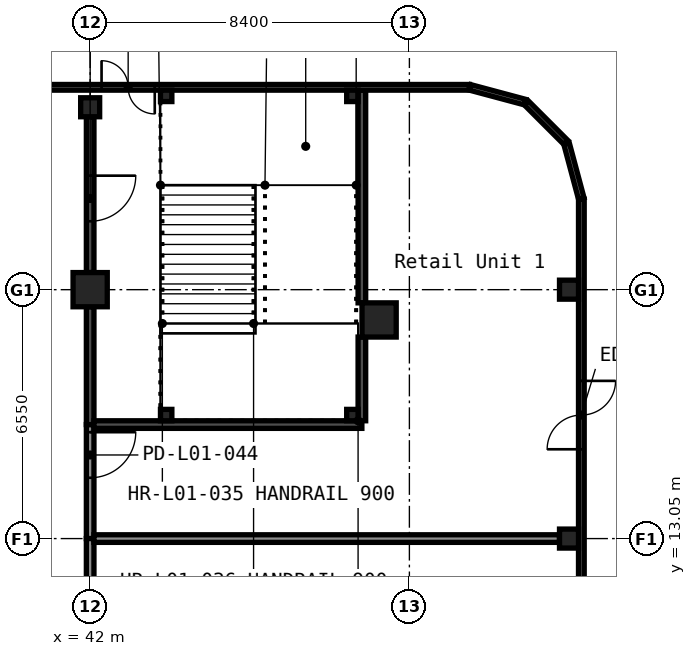
"""IFC4 building model, lengths in metres.
Left out: names, types, materials, properties, quantities, classifications, styles, units other than length and angle.
Written with IfcOpenShell. Run it as: python <this file> out.ifc"""

import sys

from ifc_helpers import new_model, si_unit, direction, frame, frame_2d, origin, origin_2d, place, context, subcontext, project, spatial, rectangle, hollow_rectangle, extrude, element, fill, save


model = new_model("IFC4")
c1 = context("Model", 3, precision=1e-05, world=origin(), true_north=direction((0.0, 1.0)))
c2 = subcontext(c1, "Body", "Model", "MODEL_VIEW")
j1 = project(units=[si_unit("LENGTHUNIT", "METRE"), si_unit("PLANEANGLEUNIT", "RADIAN")], contexts=[c1])
p1 = place(None, origin())
s1 = spatial("IfcSite", under=j1, at=p1, CompositionType="ELEMENT")
p2 = place(p1, origin())
s2 = spatial("IfcBuilding", under=s1, at=p2, CompositionType="ELEMENT")
p3 = place(p2, origin())
s3 = spatial("IfcBuildingStorey", under=s2, at=p3, CompositionType="ELEMENT", Elevation=0.0)
for number, where, z_axis, x_axis in (
    (1, (42.0, 19.6, -0.3), (0.0, 0.0, 1.0), (1.0, 0.0, 0.0)),
    (2, (49.603, 18.803, -0.3), (0.0, 0.0, 1.0), (1.0, 0.0, 0.0)),
):
    element("IfcColumn", number, at=place(p3, frame(where, z_axis=z_axis, x_axis=x_axis)), inside=s3, PredefinedType="COLUMN", context=c2, shape_type="SweptSolid", body=[
        extrude(hollow_rectangle(XDim=0.9, YDim=0.9, WallThickness=0.036, at=origin_2d()), origin(), (0.0, 0.0, 1.0), 8.9),
    ])
for number, where, z_axis, x_axis in (
    (3, (42.0, 24.4, -0.3), (0.0, 0.0, 1.0), (1.0, 0.0, 0.0)),
    (4, (54.6, 13.05, -0.3), (0.0, 0.0, 1.0), (1.0, 0.0, 0.0)),
    (5, (54.6, 19.6, -0.3), (0.0, 0.0, 1.0), (1.0, 0.0, 0.0)),
):
    element("IfcColumn", number, at=place(p3, frame(where, z_axis=z_axis, x_axis=x_axis)), inside=s3, PredefinedType="COLUMN", context=c2, shape_type="SweptSolid", body=[
        extrude(hollow_rectangle(XDim=0.5, YDim=0.5, WallThickness=0.019, InnerFilletRadius=0.029, OuterFilletRadius=0.048, at=origin_2d()), origin(), (0.0, 0.0, 1.0), 8.9),
    ])
p4 = place(p3, frame((42.0, 16.05, 0.0), z_axis=(0.0, 0.0, 1.0), x_axis=(0.0, -1.0, 0.0)))
e6 = element("IfcWall", 6, at=p4, inside=s3, PredefinedType="PARTITIONING", context=c2, shape_type="SweptSolid", body=[
    extrude(rectangle(XDim=3.0, YDim=0.2, at=frame_2d((1.5, 0.0))), origin(), (0.0, 0.0, 1.0), 8.6),
])
p5 = place(p4, frame((0.2, 0.0, 0.0)))
e7 = element("IfcOpeningElement", 7, at=p5, cuts=e6, PredefinedType="OPENING", context=c2, shape_type="SweptSolid", body=[
    extrude(rectangle(XDim=1.2, YDim=2.1, at=frame_2d((0.6, 1.05))), frame((0.0, 0.11, 0.0), z_axis=(0.0, -1.0, 0.0), x_axis=(1.0, 0.0, 0.0)), (0.0, 0.0, 1.0), 0.22),
])
p6 = place(p3, frame((42.0, 13.05, 0.0), z_axis=(0.0, 0.0, 1.0), x_axis=(0.0, -1.0, 0.0)))
e8 = element("IfcWall", 8, at=p6, inside=s3, PredefinedType="PARTITIONING", context=c2, shape_type="SweptSolid", body=[
    extrude(rectangle(XDim=6.05, YDim=0.2, at=frame_2d((3.025, 0.0))), origin(), (0.0, 0.0, 1.0), 8.6),
])
p7 = place(p6, frame((2.675, 0.0, 0.0)))
e9 = element("IfcOpeningElement", 9, at=p7, cuts=e8, PredefinedType="OPENING", context=c2, shape_type="SweptSolid", body=[
    extrude(rectangle(XDim=1.2, YDim=2.1, at=frame_2d((0.6, 1.05))), frame((0.0, 0.11, 0.0), z_axis=(0.0, -1.0, 0.0), x_axis=(1.0, 0.0, 0.0)), (0.0, 0.0, 1.0), 0.22),
])
p8 = place(p3, frame((42.0, 16.05, 0.0), z_axis=(0.0, 0.0, 1.0), x_axis=(0.0, 1.0, 0.0)))
e10 = element("IfcWall", 10, at=p8, inside=s3, PredefinedType="SHEAR", context=c2, shape_type="SweptSolid", body=[
    extrude(rectangle(XDim=3.1, YDim=0.2, at=frame_2d((1.55, 0.0))), origin(), (0.0, 0.0, 1.0), 8.6),
])
p9 = place(p3, frame((42.0, 20.05, 0.0), z_axis=(0.0, 0.0, 1.0), x_axis=(0.0, 1.0, 0.0)))
e11 = element("IfcWall", 11, at=p9, inside=s3, PredefinedType="SHEAR", context=c2, shape_type="SweptSolid", body=[
    extrude(rectangle(XDim=4.1, YDim=0.2, at=frame_2d((2.05, 0.0))), origin(), (0.0, 0.0, 1.0), 8.6),
])
p10 = place(p9, frame((1.35, 0.0, 0.0)))
e12 = element("IfcOpeningElement", 12, at=p10, cuts=e11, PredefinedType="OPENING", context=c2, shape_type="SweptSolid", body=[
    extrude(rectangle(XDim=1.2, YDim=2.1, at=frame_2d((0.6, 1.05))), frame((0.0, 0.11, 0.0), z_axis=(0.0, -1.0, 0.0), x_axis=(1.0, 0.0, 0.0)), (0.0, 0.0, 1.0), 0.22),
])
p11 = place(p3, frame((49.15, 16.05, 0.0), z_axis=(0.0, 0.0, 1.0), x_axis=(-1.0, 0.0, 0.0)))
e13 = element("IfcWall", 13, at=p11, inside=s3, PredefinedType="SHEAR", context=c2, shape_type="SweptSolid", body=[
    extrude(rectangle(XDim=7.05, YDim=0.2, at=frame_2d((3.525, 0.0))), origin(), (0.0, 0.0, 1.0), 8.6),
])
p12 = place(p3, frame((49.15, 24.85, 0.0), z_axis=(0.0, 0.0, 1.0), x_axis=(0.0, -1.0, 0.0)))
e14 = element("IfcWall", 14, at=p12, inside=s3, PredefinedType="SHEAR", context=c2, shape_type="SweptSolid", body=[
    extrude(rectangle(XDim=5.597, YDim=0.2, at=frame_2d((2.798, 0.0))), origin(), (0.0, 0.0, 1.0), 8.6),
])
p13 = place(p3, frame((49.15, 18.353, 0.0), z_axis=(0.0, 0.0, 1.0), x_axis=(0.0, -1.0, 0.0)))
e15 = element("IfcWall", 15, at=p13, inside=s3, PredefinedType="SHEAR", context=c2, shape_type="SweptSolid", body=[
    extrude(rectangle(XDim=2.203, YDim=0.2, at=frame_2d((1.102, 0.0))), origin(), (0.0, 0.0, 1.0), 8.6),
])
p14 = place(p3, frame((54.35, 13.05, 0.0), z_axis=(0.0, 0.0, 1.0), x_axis=(-1.0, 0.0, 0.0)))
e16 = element("IfcWall", 16, at=p14, inside=s3, PredefinedType="PARTITIONING", context=c2, shape_type="SweptSolid", body=[
    extrude(rectangle(XDim=12.25, YDim=0.2, at=frame_2d((6.125, 0.0))), origin(), (0.0, 0.0, 1.0), 8.6),
])
p15 = place(p3, frame((39.0, 24.925, 0.0), z_axis=(0.0, 0.0, 1.0), x_axis=(1.0, 0.0, 0.0)))
e17 = element("IfcWall", 17, at=p15, inside=s3, PredefinedType="STANDARD", context=c2, shape_type="SweptSolid", body=[
    extrude(rectangle(XDim=12.98, YDim=0.15, at=frame_2d((6.49, 0.0))), origin(), (0.0, 0.0, 1.0), 8.6),
])
p16 = place(p15, frame((3.3, 0.0, 0.0)))
e18 = element("IfcOpeningElement", 18, at=p16, cuts=e17, PredefinedType="OPENING", context=c2, shape_type="SweptSolid", body=[
    extrude(rectangle(XDim=1.4, YDim=2.1, at=frame_2d((0.7, 1.05))), frame((0.0, 0.085, 0.0), z_axis=(0.0, -1.0, 0.0), x_axis=(1.0, 0.0, 0.0)), (0.0, 0.0, 1.0), 0.17),
])
p17 = place(p3, frame((52.0, 24.922, 0.0), z_axis=(0.0, 0.0, 1.0), x_axis=(0.965946591624, -0.258741535379, 0.0)))
e19 = element("IfcWall", 19, at=p17, inside=s3, PredefinedType="STANDARD", context=c2, shape_type="SweptSolid", body=[
    extrude(rectangle(XDim=1.493, YDim=0.15, at=frame_2d((0.746, 0.0))), origin(), (0.0, 0.0, 1.0), 8.6),
])
p18 = place(p3, frame((53.475, 24.517, 0.0), z_axis=(0.0, 0.0, 1.0), x_axis=(0.707106781187, -0.707106781187, 0.0)))
e20 = element("IfcWall", 20, at=p18, inside=s3, PredefinedType="STANDARD", context=c2, shape_type="SweptSolid", body=[
    extrude(rectangle(XDim=1.473, YDim=0.15, at=frame_2d((0.736, 0.0))), origin(), (0.0, 0.0, 1.0), 8.6),
])
p19 = place(p3, frame((54.536, 23.442, 0.0), z_axis=(0.0, 0.0, 1.0), x_axis=(0.258741535379, -0.965946591624, 0.0)))
e21 = element("IfcWall", 21, at=p19, inside=s3, PredefinedType="STANDARD", context=c2, shape_type="SweptSolid", body=[
    extrude(rectangle(XDim=1.493, YDim=0.15, at=frame_2d((0.746, 0.0))), origin(), (0.0, 0.0, 1.0), 8.6),
])
p20 = place(p3, frame((54.925, 21.98, 0.0), z_axis=(0.0, 0.0, 1.0), x_axis=(0.0, -1.0, 0.0)))
e22 = element("IfcWall", 22, at=p20, inside=s3, PredefinedType="STANDARD", context=c2, shape_type="SweptSolid", body=[
    extrude(rectangle(XDim=15.48, YDim=0.15, at=frame_2d((7.74, 0.0))), origin(), (0.0, 0.0, 1.0), 8.6),
])
p21 = place(p20, frame((4.78, 0.0, 0.0)))
e23 = element("IfcOpeningElement", 23, at=p21, cuts=e22, PredefinedType="OPENING", context=c2, shape_type="SweptSolid", body=[
    extrude(rectangle(XDim=1.8, YDim=2.1, at=frame_2d((0.9, 1.05))), frame((0.0, 0.085, 0.0), z_axis=(0.0, -1.0, 0.0), x_axis=(1.0, 0.0, 0.0)), (0.0, 0.0, 1.0), 0.17),
])
p22 = place(p20, frame((11.305, 0.0, 0.0)))
e24 = element("IfcOpeningElement", 24, at=p22, cuts=e22, PredefinedType="OPENING", context=c2, shape_type="SweptSolid", body=[
    extrude(rectangle(XDim=1.8, YDim=2.1, at=frame_2d((0.9, 1.05))), frame((0.0, 0.085, 0.0), z_axis=(0.0, -1.0, 0.0), x_axis=(1.0, 0.0, 0.0)), (0.0, 0.0, 1.0), 0.17),
])
for number, where, z_axis, x_axis in (
    (25, (44.0, 24.7, 0.0), (0.0, 0.0, 1.0), (1.0, 0.0, 0.0)),
    (26, (48.9, 24.7, 0.0), (0.0, 0.0, 1.0), (1.0, 0.0, 0.0)),
    (27, (44.0, 16.3, 0.0), (0.0, 0.0, 1.0), (1.0, 0.0, 0.0)),
    (28, (48.9, 16.3, 0.0), (0.0, 0.0, 1.0), (1.0, 0.0, 0.0)),
):
    element("IfcColumn", number, at=place(p3, frame(where, z_axis=z_axis, x_axis=x_axis)), inside=s3, PredefinedType="COLUMN", context=c2, shape_type="SweptSolid", body=[
        extrude(rectangle(XDim=0.3, YDim=0.3, at=origin_2d()), origin(), (0.0, 0.0, 1.0), 8.7),
    ])
p23 = place(p10, origin())
e29 = element("IfcDoor", 29, at=p23, inside=s3, OperationType="SINGLE_SWING_RIGHT", PredefinedType="DOOR", context=c2, shape_type="SweptSolid", body=[
    extrude(rectangle(XDim=1.2, YDim=2.1, at=frame_2d((0.6, 1.05))), frame((0.0, 0.025, 0.0), z_axis=(0.0, -1.0, 0.0), x_axis=(1.0, 0.0, 0.0)), (0.0, 0.0, 1.0), 0.05),
])
fill(e12, e29)
p24 = place(p5, origin())
e30 = element("IfcDoor", 30, at=p24, inside=s3, OperationType="SINGLE_SWING_RIGHT", PredefinedType="DOOR", context=c2, shape_type="SweptSolid", body=[
    extrude(rectangle(XDim=1.2, YDim=2.1, at=frame_2d((0.6, 1.05))), frame((0.0, 0.025, 0.0), z_axis=(0.0, -1.0, 0.0), x_axis=(1.0, 0.0, 0.0)), (0.0, 0.0, 1.0), 0.05),
])
fill(e7, e30)
p25 = place(p16, origin())
e31 = element("IfcDoor", 31, at=p25, inside=s3, OperationType="DOUBLE_DOOR_SINGLE_SWING", PredefinedType="DOOR", context=c2, shape_type="SweptSolid", body=[
    extrude(rectangle(XDim=1.4, YDim=2.1, at=frame_2d((0.7, 1.05))), frame((0.0, 0.025, 0.0), z_axis=(0.0, -1.0, 0.0), x_axis=(1.0, 0.0, 0.0)), (0.0, 0.0, 1.0), 0.05),
])
fill(e18, e31)
p26 = place(p21, origin())
e32 = element("IfcDoor", 32, at=p26, inside=s3, OperationType="DOUBLE_DOOR_DOUBLE_SWING", PredefinedType="DOOR", context=c2, shape_type="SweptSolid", body=[
    extrude(rectangle(XDim=1.8, YDim=2.1, at=frame_2d((0.9, 1.05))), frame((0.0, 0.025, 0.0), z_axis=(0.0, -1.0, 0.0), x_axis=(1.0, 0.0, 0.0)), (0.0, 0.0, 1.0), 0.05),
])
fill(e23, e32)
save(model, sys.argv[1])
